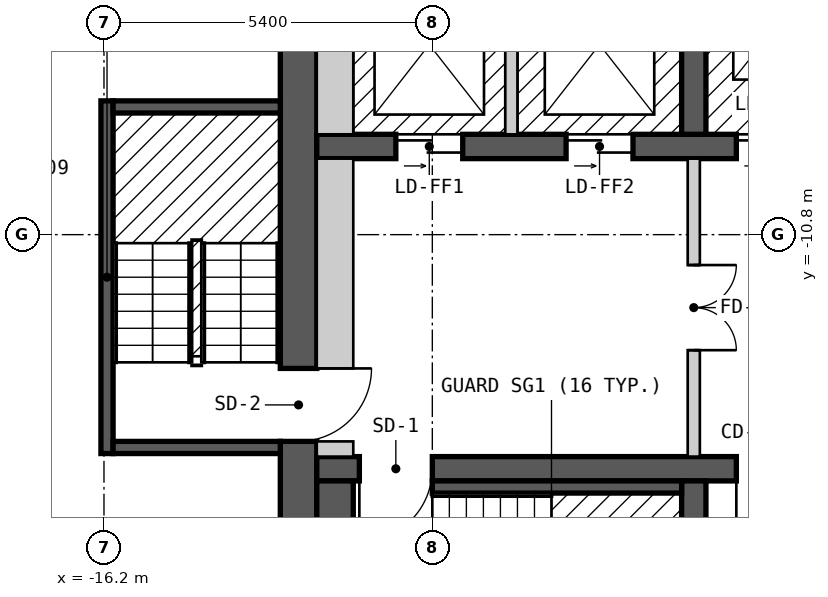
"""IFC4 building model, lengths in metres.
Left out: names, types, materials, properties, quantities, classifications, styles, units other than length and angle.
Written with IfcOpenShell. Run it as: python <this file> out.ifc"""

import sys

from ifc_helpers import new_model, si_unit, direction, frame, frame_2d, origin, origin_2d, place, context, subcontext, project, spatial, polyline, rectangle, outline, extrude, element, fill, save


model = new_model("IFC4")
c1 = context("Model", 3, precision=1e-05, world=origin(), true_north=direction((0.0, 1.0)))
c2 = subcontext(c1, "Body", "Model", "MODEL_VIEW")
j1 = project(units=[si_unit("LENGTHUNIT", "METRE"), si_unit("PLANEANGLEUNIT", "RADIAN")], contexts=[c1])
p1 = place(None, origin())
s1 = spatial("IfcSite", under=j1, at=p1, CompositionType="ELEMENT")
p2 = place(p1, origin())
s2 = spatial("IfcBuilding", under=s1, at=p2, CompositionType="ELEMENT")
p3 = place(p2, frame((0.0, 0.0, 169.2)))
s3 = spatial("IfcBuildingStorey", under=s2, at=p3, CompositionType="ELEMENT", Elevation=169.2)
p4 = place(p3, frame((-17.53, -15.736, 0.0), z_axis=(0.0, 0.0, 1.0), x_axis=(0.5, -0.866025403784, 0.0)))
e1 = element("IfcColumn", 1, at=p4, inside=s3, PredefinedType="COLUMN", context=c2, shape_type="SweptSolid", body=[
    extrude(rectangle(XDim=0.8, YDim=0.8, at=origin_2d()), origin(), (0.0, 0.0, 1.0), 3.0),
])
p5 = place(p3, frame((-13.0, -18.4, 0.0), z_axis=(0.0, 0.0, 1.0), x_axis=(0.0, 1.0, 0.0)))
e2 = element("IfcWall", 2, at=p5, inside=s3, PredefinedType="SHEAR", context=c2, shape_type="SweptSolid", body=[
    extrude(rectangle(XDim=12.8, YDim=0.6, at=frame_2d((6.4, 0.0))), origin(), (0.0, 0.0, 1.0), 2.7),
])
p6 = place(p5, frame((4.2, 0.0, 0.0)))
e3 = element("IfcOpeningElement", 3, at=p6, cuts=e2, PredefinedType="OPENING", context=c2, shape_type="SweptSolid", body=[
    extrude(rectangle(XDim=1.2, YDim=2.1, at=frame_2d((0.6, 1.05))), frame((0.0, 0.31, 0.0), z_axis=(0.0, -1.0, 0.0), x_axis=(1.0, 0.0, 0.0)), (0.0, 0.0, 1.0), 0.62),
])
p7 = place(p3, frame((-12.7, -14.65, 0.0), z_axis=(0.0, 0.0, 1.0), x_axis=(1.0, 0.0, 0.0)))
e4 = element("IfcWall", 4, at=p7, inside=s3, PredefinedType="SHEAR", context=c2, shape_type="SweptSolid", body=[
    extrude(rectangle(XDim=25.4, YDim=0.4, at=frame_2d((12.7, 0.0))), origin(), (0.0, 0.0, 1.0), 2.7),
])
p8 = place(p7, frame((1.9, 0.0, 0.0), z_axis=(0.0, 0.0, 1.0), x_axis=(-1.0, 0.0, 0.0)))
e5 = element("IfcOpeningElement", 5, at=p8, cuts=e4, PredefinedType="OPENING", context=c2, shape_type="SweptSolid", body=[
    extrude(rectangle(XDim=1.2, YDim=2.1, at=frame_2d((0.6, 1.05))), frame((0.0, 0.21, 0.0), z_axis=(0.0, -1.0, 0.0), x_axis=(1.0, 0.0, 0.0)), (0.0, 0.0, 1.0), 0.42),
])
p9 = place(p7, frame((24.75, 0.0, 0.0), z_axis=(0.0, 0.0, 1.0), x_axis=(-1.0, 0.0, 0.0)))
e6 = element("IfcOpeningElement", 6, at=p9, cuts=e4, PredefinedType="OPENING", context=c2, shape_type="SweptSolid", body=[
    extrude(rectangle(XDim=1.2, YDim=2.1, at=frame_2d((0.6, 1.05))), frame((0.0, 0.21, 0.0), z_axis=(0.0, -1.0, 0.0), x_axis=(1.0, 0.0, 0.0)), (0.0, 0.0, 1.0), 0.42),
])
p10 = place(p7, frame((7.8, 0.0, 0.0), z_axis=(0.0, 0.0, 1.0), x_axis=(-1.0, 0.0, 0.0)))
e7 = element("IfcOpeningElement", 7, at=p10, cuts=e4, PredefinedType="OPENING", context=c2, shape_type="SweptSolid", body=[
    extrude(rectangle(XDim=0.9, YDim=2.1, at=frame_2d((0.45, 1.05))), frame((0.0, 0.21, 0.0), z_axis=(0.0, -1.0, 0.0), x_axis=(1.0, 0.0, 0.0)), (0.0, 0.0, 1.0), 0.42),
])
p11 = place(p7, frame((9.85, 0.0, 0.0), z_axis=(0.0, 0.0, 1.0), x_axis=(-1.0, 0.0, 0.0)))
e8 = element("IfcOpeningElement", 8, at=p11, cuts=e4, PredefinedType="OPENING", context=c2, shape_type="SweptSolid", body=[
    extrude(rectangle(XDim=0.9, YDim=2.1, at=frame_2d((0.45, 1.05))), frame((0.0, 0.21, 0.0), z_axis=(0.0, -1.0, 0.0), x_axis=(1.0, 0.0, 0.0)), (0.0, 0.0, 1.0), 0.42),
])
p12 = place(p7, frame((12.15, 0.0, 0.0), z_axis=(0.0, 0.0, 1.0), x_axis=(-1.0, 0.0, 0.0)))
e9 = element("IfcOpeningElement", 9, at=p12, cuts=e4, PredefinedType="OPENING", context=c2, shape_type="SweptSolid", body=[
    extrude(rectangle(XDim=1.0, YDim=2.1, at=frame_2d((0.5, 1.05))), frame((0.0, 0.21, 0.0), z_axis=(0.0, -1.0, 0.0), x_axis=(1.0, 0.0, 0.0)), (0.0, 0.0, 1.0), 0.42),
])
p13 = place(p7, frame((14.35, 0.0, 0.0), z_axis=(0.0, 0.0, 1.0), x_axis=(-1.0, 0.0, 0.0)))
e10 = element("IfcOpeningElement", 10, at=p13, cuts=e4, PredefinedType="OPENING", context=c2, shape_type="SweptSolid", body=[
    extrude(rectangle(XDim=0.9, YDim=2.1, at=frame_2d((0.45, 1.05))), frame((0.0, 0.21, 0.0), z_axis=(0.0, -1.0, 0.0), x_axis=(1.0, 0.0, 0.0)), (0.0, 0.0, 1.0), 0.42),
])
p14 = place(p7, frame((16.35, 0.0, 0.0), z_axis=(0.0, 0.0, 1.0), x_axis=(-1.0, 0.0, 0.0)))
e11 = element("IfcOpeningElement", 11, at=p14, cuts=e4, PredefinedType="OPENING", context=c2, shape_type="SweptSolid", body=[
    extrude(rectangle(XDim=0.9, YDim=2.1, at=frame_2d((0.45, 1.05))), frame((0.0, 0.21, 0.0), z_axis=(0.0, -1.0, 0.0), x_axis=(1.0, 0.0, 0.0)), (0.0, 0.0, 1.0), 0.42),
])
p15 = place(p7, frame((18.5, 0.0, 0.0), z_axis=(0.0, 0.0, 1.0), x_axis=(-1.0, 0.0, 0.0)))
e12 = element("IfcOpeningElement", 12, at=p15, cuts=e4, PredefinedType="OPENING", context=c2, shape_type="SweptSolid", body=[
    extrude(rectangle(XDim=1.0, YDim=2.1, at=frame_2d((0.5, 1.05))), frame((0.0, 0.21, 0.0), z_axis=(0.0, -1.0, 0.0), x_axis=(1.0, 0.0, 0.0)), (0.0, 0.0, 1.0), 0.42),
])
p16 = place(p3, frame((-12.7, -9.35, 0.0), z_axis=(0.0, 0.0, 1.0), x_axis=(1.0, 0.0, 0.0)))
e13 = element("IfcWall", 13, at=p16, inside=s3, PredefinedType="SHEAR", context=c2, shape_type="SweptSolid", body=[
    extrude(rectangle(XDim=22.9, YDim=0.4, at=frame_2d((11.45, 0.0))), origin(), (0.0, 0.0, 1.0), 2.7),
])
p17 = place(p16, frame((1.3, 0.0, 0.0)))
e14 = element("IfcOpeningElement", 14, at=p17, cuts=e13, PredefinedType="OPENING", context=c2, shape_type="SweptSolid", body=[
    extrude(rectangle(XDim=1.1, YDim=2.1, at=frame_2d((0.55, 1.05))), frame((0.0, 0.21, 0.0), z_axis=(0.0, -1.0, 0.0), x_axis=(1.0, 0.0, 0.0)), (0.0, 0.0, 1.0), 0.42),
])
p18 = place(p16, frame((4.1, 0.0, 0.0)))
e15 = element("IfcOpeningElement", 15, at=p18, cuts=e13, PredefinedType="OPENING", context=c2, shape_type="SweptSolid", body=[
    extrude(rectangle(XDim=1.1, YDim=2.1, at=frame_2d((0.55, 1.05))), frame((0.0, 0.21, 0.0), z_axis=(0.0, -1.0, 0.0), x_axis=(1.0, 0.0, 0.0)), (0.0, 0.0, 1.0), 0.42),
])
p19 = place(p16, frame((6.9, 0.0, 0.0)))
e16 = element("IfcOpeningElement", 16, at=p19, cuts=e13, PredefinedType="OPENING", context=c2, shape_type="SweptSolid", body=[
    extrude(rectangle(XDim=1.1, YDim=2.1, at=frame_2d((0.55, 1.05))), frame((0.0, 0.21, 0.0), z_axis=(0.0, -1.0, 0.0), x_axis=(1.0, 0.0, 0.0)), (0.0, 0.0, 1.0), 0.42),
])
p20 = place(p16, frame((9.2, 0.0, 0.0)))
e17 = element("IfcOpeningElement", 17, at=p20, cuts=e13, PredefinedType="OPENING", context=c2, shape_type="SweptSolid", body=[
    extrude(rectangle(XDim=1.1, YDim=2.1, at=frame_2d((0.55, 1.05))), frame((0.0, 0.21, 0.0), z_axis=(0.0, -1.0, 0.0), x_axis=(1.0, 0.0, 0.0)), (0.0, 0.0, 1.0), 0.42),
])
p21 = place(p16, frame((11.5, 0.0, 0.0)))
e18 = element("IfcOpeningElement", 18, at=p21, cuts=e13, PredefinedType="OPENING", context=c2, shape_type="SweptSolid", body=[
    extrude(rectangle(XDim=1.1, YDim=2.1, at=frame_2d((0.55, 1.05))), frame((0.0, 0.21, 0.0), z_axis=(0.0, -1.0, 0.0), x_axis=(1.0, 0.0, 0.0)), (0.0, 0.0, 1.0), 0.42),
])
p22 = place(p16, frame((13.8, 0.0, 0.0)))
e19 = element("IfcOpeningElement", 19, at=p22, cuts=e13, PredefinedType="OPENING", context=c2, shape_type="SweptSolid", body=[
    extrude(rectangle(XDim=1.1, YDim=2.1, at=frame_2d((0.55, 1.05))), frame((0.0, 0.21, 0.0), z_axis=(0.0, -1.0, 0.0), x_axis=(1.0, 0.0, 0.0)), (0.0, 0.0, 1.0), 0.42),
])
p23 = place(p16, frame((16.1, 0.0, 0.0)))
e20 = element("IfcOpeningElement", 20, at=p23, cuts=e13, PredefinedType="OPENING", context=c2, shape_type="SweptSolid", body=[
    extrude(rectangle(XDim=1.1, YDim=2.1, at=frame_2d((0.55, 1.05))), frame((0.0, 0.21, 0.0), z_axis=(0.0, -1.0, 0.0), x_axis=(1.0, 0.0, 0.0)), (0.0, 0.0, 1.0), 0.42),
])
p24 = place(p16, frame((18.4, 0.0, 0.0)))
e21 = element("IfcOpeningElement", 21, at=p24, cuts=e13, PredefinedType="OPENING", context=c2, shape_type="SweptSolid", body=[
    extrude(rectangle(XDim=1.1, YDim=2.1, at=frame_2d((0.55, 1.05))), frame((0.0, 0.21, 0.0), z_axis=(0.0, -1.0, 0.0), x_axis=(1.0, 0.0, 0.0)), (0.0, 0.0, 1.0), 0.42),
])
p25 = place(p16, frame((20.8, 0.0, 0.0)))
e22 = element("IfcOpeningElement", 22, at=p25, cuts=e13, PredefinedType="OPENING", context=c2, shape_type="SweptSolid", body=[
    extrude(rectangle(XDim=1.1, YDim=2.1, at=frame_2d((0.55, 1.05))), frame((0.0, 0.21, 0.0), z_axis=(0.0, -1.0, 0.0), x_axis=(1.0, 0.0, 0.0)), (0.0, 0.0, 1.0), 0.42),
])
for number, where, z_axis, x_axis in (
    (23, (-6.5, -18.4, 0.0), (0.0, 0.0, 1.0), (0.0, 1.0, 0.0)),
    (24, (-6.5, -9.15, 0.0), (0.0, 0.0, 1.0), (0.0, 1.0, 0.0)),
):
    element("IfcWall", number, at=place(p3, frame(where, z_axis=z_axis, x_axis=x_axis)), inside=s3, PredefinedType="SHEAR", context=c2, shape_type="SweptSolid", body=[
        extrude(rectangle(XDim=3.55, YDim=0.4, at=frame_2d((1.775, 0.0))), origin(), (0.0, 0.0, 1.0), 2.7),
    ])
p26 = place(p3, frame((-26.024, -3.025, 0.0), z_axis=(0.0, 0.0, 1.0), x_axis=(0.500018670445, -0.86601462413, 0.0)))
e25 = element("IfcWall", 25, at=p26, inside=s3, PredefinedType="SOLIDWALL", context=c2, shape_type="SweptSolid", body=[
    extrude(outline(polyline([(0.0, -0.15), (20.785, -0.15), (20.705, 0.15), (0.08, 0.15), (0.0, -0.15)])), origin(), (0.0, 0.0, 1.0), 2.7),
])
p27 = place(p26, frame((2.346, 0.0, 0.15)))
e26 = element("IfcOpeningElement", 26, at=p27, cuts=e25, PredefinedType="OPENING", context=c2, shape_type="SweptSolid", body=[
    extrude(rectangle(XDim=1.5, YDim=2.1, at=frame_2d((0.75, 1.05))), frame((0.0, 0.16, 0.0), z_axis=(0.0, -1.0, 0.0), x_axis=(1.0, 0.0, 0.0)), (0.0, 0.0, 1.0), 0.32),
])
p28 = place(p26, frame((7.21, 0.0, 0.15)))
e27 = element("IfcOpeningElement", 27, at=p28, cuts=e25, PredefinedType="OPENING", context=c2, shape_type="SweptSolid", body=[
    extrude(rectangle(XDim=1.5, YDim=2.1, at=frame_2d((0.75, 1.05))), frame((0.0, 0.16, 0.0), z_axis=(0.0, -1.0, 0.0), x_axis=(1.0, 0.0, 0.0)), (0.0, 0.0, 1.0), 0.32),
])
p29 = place(p26, frame((12.073, 0.0, 0.15)))
e28 = element("IfcOpeningElement", 28, at=p29, cuts=e25, PredefinedType="OPENING", context=c2, shape_type="SweptSolid", body=[
    extrude(rectangle(XDim=1.5, YDim=2.1, at=frame_2d((0.75, 1.05))), frame((0.0, 0.16, 0.0), z_axis=(0.0, -1.0, 0.0), x_axis=(1.0, 0.0, 0.0)), (0.0, 0.0, 1.0), 0.32),
])
p30 = place(p26, frame((16.938, 0.0, 0.15)))
e29 = element("IfcOpeningElement", 29, at=p30, cuts=e25, PredefinedType="OPENING", context=c2, shape_type="SweptSolid", body=[
    extrude(rectangle(XDim=1.5, YDim=2.1, at=frame_2d((0.75, 1.05))), frame((0.0, 0.16, 0.0), z_axis=(0.0, -1.0, 0.0), x_axis=(1.0, 0.0, 0.0)), (0.0, 0.0, 1.0), 0.32),
])
p31 = place(p3, frame((-23.13, -7.737, 0.0), z_axis=(0.0, 0.0, 1.0), x_axis=(0.86598451299, 0.500070818246, 0.0)))
e30 = element("IfcWall", 30, at=p31, inside=s3, PredefinedType="PARTITIONING", context=c2, shape_type="SweptSolid", body=[
    extrude(rectangle(XDim=8.695, YDim=0.2, at=frame_2d((4.348, 0.0))), origin(), (0.0, 0.0, 1.0), 2.7),
])
p32 = place(p3, frame((-16.15, -14.4, 0.0), z_axis=(0.0, 0.0, 1.0), x_axis=(0.0, 1.0, 0.0)))
e31 = element("IfcWall", 31, at=p32, inside=s3, PredefinedType="SOLIDWALL", context=c2, shape_type="SweptSolid", body=[
    extrude(rectangle(XDim=5.8, YDim=0.2, at=frame_2d((2.9, 0.0))), origin(), (0.0, 0.0, 1.0), 2.7),
])
for number, where, z_axis, x_axis in (
    (32, (-16.05, -14.3, 0.0), (0.0, 0.0, 1.0), (1.0, 0.0, 0.0)),
    (33, (-16.05, -8.7, 0.0), (0.0, 0.0, 1.0), (1.0, 0.0, 0.0)),
):
    element("IfcWall", number, at=place(p3, frame(where, z_axis=z_axis, x_axis=x_axis)), inside=s3, PredefinedType="SOLIDWALL", context=c2, shape_type="SweptSolid", body=[
        extrude(rectangle(XDim=2.75, YDim=0.2, at=frame_2d((1.375, 0.0))), origin(), (0.0, 0.0, 1.0), 2.7),
    ])
p33 = place(p3, frame((-12.4, -18.4, 0.0), z_axis=(0.0, 0.0, 1.0), x_axis=(0.0, 1.0, 0.0)))
e34 = element("IfcWall", 34, at=p33, inside=s3, PredefinedType="SOLIDWALL", context=c2, shape_type="SweptSolid", body=[
    extrude(rectangle(XDim=3.55, YDim=0.6, at=frame_2d((1.775, 0.0))), origin(), (0.0, 0.0, 1.0), 2.7),
])
p34 = place(p3, frame((-12.7, -14.325, 0.0), z_axis=(0.0, 0.0, 1.0), x_axis=(1.0, 0.0, 0.0)))
e35 = element("IfcWall", 35, at=p34, inside=s3, PredefinedType="PARTITIONING", context=c2, shape_type="SweptSolid", body=[
    extrude(rectangle(XDim=0.6, YDim=0.25, at=frame_2d((0.3, 0.0))), origin(), (0.0, 0.0, 1.0), 2.7),
])
p35 = place(p3, frame((-12.4, -13.0, 0.0), z_axis=(0.0, 0.0, 1.0), x_axis=(0.0, 1.0, 0.0)))
e36 = element("IfcWall", 36, at=p35, inside=s3, PredefinedType="PARTITIONING", context=c2, shape_type="SweptSolid", body=[
    extrude(rectangle(XDim=3.45, YDim=0.6, at=frame_2d((1.725, 0.0))), origin(), (0.0, 0.0, 1.0), 2.7),
])
p36 = place(p3, frame((-12.4, -9.15, 0.0), z_axis=(0.0, 0.0, 1.0), x_axis=(0.0, 1.0, 0.0)))
e37 = element("IfcWall", 37, at=p36, inside=s3, PredefinedType="SOLIDWALL", context=c2, shape_type="SweptSolid", body=[
    extrude(rectangle(XDim=3.55, YDim=0.6, at=frame_2d((1.775, 0.0))), origin(), (0.0, 0.0, 1.0), 2.7),
])
p37 = place(p3, frame((-10.8, -14.95, 0.0), z_axis=(0.0, 0.0, 1.0), x_axis=(1.0, 0.0, 0.0)))
e38 = element("IfcWall", 38, at=p37, inside=s3, PredefinedType="SOLIDWALL", context=c2, shape_type="SweptSolid", body=[
    extrude(rectangle(XDim=4.1, YDim=0.2, at=frame_2d((2.05, 0.0))), origin(), (0.0, 0.0, 1.0), 2.7),
])
p38 = place(p3, frame((-9.5, -9.15, 0.0), z_axis=(0.0, 0.0, 1.0), x_axis=(0.0, 1.0, 0.0)))
e39 = element("IfcWall", 39, at=p38, inside=s3, PredefinedType="SOLIDWALL", context=c2, shape_type="SweptSolid", body=[
    extrude(rectangle(XDim=2.95, YDim=0.2, at=frame_2d((1.475, 0.0))), origin(), (0.0, 0.0, 1.0), 2.7),
])
p39 = place(p3, frame((-6.5, -14.45, 0.0), z_axis=(0.0, 0.0, 1.0), x_axis=(0.0, 1.0, 0.0)))
e40 = element("IfcWall", 40, at=p39, inside=s3, PredefinedType="PARTITIONING", context=c2, shape_type="SweptSolid", body=[
    extrude(rectangle(XDim=4.9, YDim=0.2, at=frame_2d((2.45, 0.0))), origin(), (0.0, 0.0, 1.0), 2.7),
])
p40 = place(p39, frame((3.15, 0.0, 0.0), z_axis=(0.0, 0.0, 1.0), x_axis=(-1.0, 0.0, 0.0)))
e41 = element("IfcOpeningElement", 41, at=p40, cuts=e40, PredefinedType="OPENING", context=c2, shape_type="SweptSolid", body=[
    extrude(rectangle(XDim=1.4, YDim=2.1, at=frame_2d((0.7, 1.05))), frame((0.0, 0.11, 0.0), z_axis=(0.0, -1.0, 0.0), x_axis=(1.0, 0.0, 0.0)), (0.0, 0.0, 1.0), 0.22),
])
p41 = place(p17, origin())
e42 = element("IfcDoor", 42, at=p41, inside=s3, OperationType="DOUBLE_DOOR_SLIDING", PredefinedType="DOOR", context=c2, shape_type="SweptSolid", body=[
    extrude(rectangle(XDim=1.1, YDim=2.1, at=frame_2d((0.55, 1.05))), frame((0.0, 0.025, 0.0), z_axis=(0.0, -1.0, 0.0), x_axis=(1.0, 0.0, 0.0)), (0.0, 0.0, 1.0), 0.05),
])
fill(e14, e42)
p42 = place(p18, origin())
e43 = element("IfcDoor", 43, at=p42, inside=s3, OperationType="DOUBLE_DOOR_SLIDING", PredefinedType="DOOR", context=c2, shape_type="SweptSolid", body=[
    extrude(rectangle(XDim=1.1, YDim=2.1, at=frame_2d((0.55, 1.05))), frame((0.0, 0.025, 0.0), z_axis=(0.0, -1.0, 0.0), x_axis=(1.0, 0.0, 0.0)), (0.0, 0.0, 1.0), 0.05),
])
fill(e15, e43)
p43 = place(p19, origin())
e44 = element("IfcDoor", 44, at=p43, inside=s3, OperationType="DOUBLE_DOOR_SLIDING", PredefinedType="DOOR", context=c2, shape_type="SweptSolid", body=[
    extrude(rectangle(XDim=1.1, YDim=2.1, at=frame_2d((0.55, 1.05))), frame((0.0, 0.025, 0.0), z_axis=(0.0, -1.0, 0.0), x_axis=(1.0, 0.0, 0.0)), (0.0, 0.0, 1.0), 0.05),
])
fill(e16, e44)
p44 = place(p8, origin())
e45 = element("IfcDoor", 45, at=p44, inside=s3, OperationType="SINGLE_SWING_RIGHT", PredefinedType="DOOR", context=c2, shape_type="SweptSolid", body=[
    extrude(rectangle(XDim=1.2, YDim=2.1, at=frame_2d((0.6, 1.05))), frame((0.0, 0.025, 0.0), z_axis=(0.0, -1.0, 0.0), x_axis=(1.0, 0.0, 0.0)), (0.0, 0.0, 1.0), 0.05),
])
fill(e5, e45)
p45 = place(p6, origin())
e46 = element("IfcDoor", 46, at=p45, inside=s3, OperationType="SINGLE_SWING_RIGHT", PredefinedType="DOOR", context=c2, shape_type="SweptSolid", body=[
    extrude(rectangle(XDim=1.2, YDim=2.1, at=frame_2d((0.6, 1.05))), frame((0.0, 0.025, 0.0), z_axis=(0.0, -1.0, 0.0), x_axis=(1.0, 0.0, 0.0)), (0.0, 0.0, 1.0), 0.05),
])
fill(e3, e46)
p46 = place(p40, origin())
e47 = element("IfcDoor", 47, at=p46, inside=s3, OperationType="DOUBLE_DOOR_SINGLE_SWING", PredefinedType="DOOR", context=c2, shape_type="SweptSolid", body=[
    extrude(rectangle(XDim=1.4, YDim=2.1, at=frame_2d((0.7, 1.05))), frame((0.0, 0.025, 0.0), z_axis=(0.0, -1.0, 0.0), x_axis=(1.0, 0.0, 0.0)), (0.0, 0.0, 1.0), 0.05),
])
fill(e41, e47)
p47 = place(p10, origin())
e48 = element("IfcDoor", 48, at=p47, inside=s3, OperationType="SINGLE_SWING_RIGHT", PredefinedType="DOOR", context=c2, shape_type="SweptSolid", body=[
    extrude(rectangle(XDim=0.9, YDim=2.1, at=frame_2d((0.45, 1.05))), frame((0.0, 0.025, 0.0), z_axis=(0.0, -1.0, 0.0), x_axis=(1.0, 0.0, 0.0)), (0.0, 0.0, 1.0), 0.05),
])
fill(e7, e48)
save(model, sys.argv[1])
